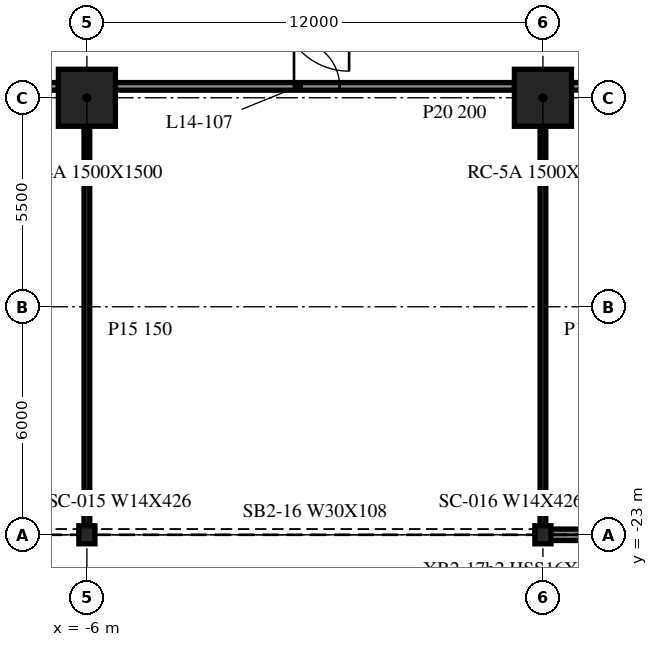
"""IFC4 building model, lengths in metres.
Left out: names, types, materials, properties, quantities, classifications, styles, units other than length and angle.
Written with IfcOpenShell. Run it as: python <this file> out.ifc"""

import sys

from ifc_helpers import new_model, si_unit, direction, frame, frame_2d, origin, origin_2d, place, context, subcontext, project, spatial, rectangle, i_section, extrude, element, fill, save


model = new_model("IFC4")
c1 = context("Model", 3, precision=1e-05, world=origin(), true_north=direction((0.0, 1.0)))
c2 = subcontext(c1, "Body", "Model", "MODEL_VIEW")
j1 = project(units=[si_unit("LENGTHUNIT", "METRE"), si_unit("PLANEANGLEUNIT", "RADIAN")], contexts=[c1])
p1 = place(None, origin())
s1 = spatial("IfcSite", under=j1, at=p1, CompositionType="ELEMENT")
p2 = place(p1, origin())
s2 = spatial("IfcBuilding", under=s1, at=p2, CompositionType="ELEMENT")
p3 = place(p2, frame((0.0, 0.0, 63.2)))
s3 = spatial("IfcBuildingStorey", under=s2, at=p3, CompositionType="ELEMENT", Elevation=63.2)
for number, where, z_axis, x_axis in (
    (1, (-6.0, -11.5, -0.34), (0.0, 0.0, 1.0), (1.0, 0.0, 0.0)),
    (2, (6.0, -11.5, -0.34), (0.0, 0.0, 1.0), (1.0, 0.0, 0.0)),
):
    element("IfcColumn", number, at=place(p3, frame(where, z_axis=z_axis, x_axis=x_axis)), inside=s3, PredefinedType="COLUMN", context=c2, shape_type="SweptSolid", body=[
        extrude(rectangle(XDim=1.5, YDim=1.5, at=origin_2d()), origin(), (0.0, 0.0, 1.0), 4.3),
    ])
for number, where, z_axis, x_axis in (
    (3, (-6.0, -23.0, -0.34), (0.0, 0.0, 1.0), (1.0, 0.0, 0.0)),
    (4, (6.0, -23.0, -0.34), (0.0, 0.0, 1.0), (1.0, 0.0, 0.0)),
):
    element("IfcColumn", number, at=place(p3, frame(where, z_axis=z_axis, x_axis=x_axis)), inside=s3, PredefinedType="COLUMN", context=c2, shape_type="SweptSolid", body=[
        extrude(i_section(OverallWidth=0.424, OverallDepth=0.475, WebThickness=0.048, FlangeThickness=0.077, at=origin_2d()), origin(), (0.0, 0.0, 1.0), 4.3),
    ])
p4 = place(p3, frame((6.024, -23.0, 0.0), z_axis=(0.0, 0.0, 1.0), x_axis=(1.0, 0.0, 0.0)))
e5 = element("IfcWall", 5, at=p4, inside=s3, PredefinedType="NOTDEFINED", context=c2, shape_type="SweptSolid", body=[
    extrude(rectangle(XDim=11.952, YDim=0.3, at=frame_2d((5.976, 0.0))), origin(), (0.0, 0.0, 1.0), 3.203),
])
p5 = place(p3, frame((-17.25, -11.2, 0.0), z_axis=(0.0, 0.0, 1.0), x_axis=(1.0, 0.0, 0.0)))
e6 = element("IfcWall", 6, at=p5, inside=s3, PredefinedType="PARTITIONING", context=c2, shape_type="SweptSolid", body=[
    extrude(rectangle(XDim=10.5, YDim=0.2, at=frame_2d((5.25, 0.0))), origin(), (0.0, 0.0, 1.0), 3.96),
])
p6 = place(p5, frame((0.9, 0.0, 0.0)))
e7 = element("IfcOpeningElement", 7, at=p6, cuts=e6, PredefinedType="OPENING", context=c2, shape_type="SweptSolid", body=[
    extrude(rectangle(XDim=1.0, YDim=2.1, at=frame_2d((0.5, 1.05))), frame((0.0, 0.11, 0.0), z_axis=(0.0, -1.0, 0.0), x_axis=(1.0, 0.0, 0.0)), (0.0, 0.0, 1.0), 0.22),
])
p7 = place(p5, frame((3.7, 0.0, 0.0)))
e8 = element("IfcOpeningElement", 8, at=p7, cuts=e6, PredefinedType="OPENING", context=c2, shape_type="SweptSolid", body=[
    extrude(rectangle(XDim=1.2, YDim=2.1, at=frame_2d((0.6, 1.05))), frame((0.0, 0.11, 0.0), z_axis=(0.0, -1.0, 0.0), x_axis=(1.0, 0.0, 0.0)), (0.0, 0.0, 1.0), 0.22),
])
p8 = place(p5, frame((5.5, 0.0, 0.0)))
e9 = element("IfcOpeningElement", 9, at=p8, cuts=e6, PredefinedType="OPENING", context=c2, shape_type="SweptSolid", body=[
    extrude(rectangle(XDim=1.2, YDim=2.1, at=frame_2d((0.6, 1.05))), frame((0.0, 0.11, 0.0), z_axis=(0.0, -1.0, 0.0), x_axis=(1.0, 0.0, 0.0)), (0.0, 0.0, 1.0), 0.22),
])
p9 = place(p3, frame((-5.25, -11.2, 0.0), z_axis=(0.0, 0.0, 1.0), x_axis=(1.0, 0.0, 0.0)))
e10 = element("IfcWall", 10, at=p9, inside=s3, PredefinedType="PARTITIONING", context=c2, shape_type="SweptSolid", body=[
    extrude(rectangle(XDim=10.5, YDim=0.2, at=frame_2d((5.25, 0.0))), origin(), (0.0, 0.0, 1.0), 3.96),
])
p10 = place(p9, frame((4.7, 0.0, 0.0)))
e11 = element("IfcOpeningElement", 11, at=p10, cuts=e10, PredefinedType="OPENING", context=c2, shape_type="SweptSolid", body=[
    extrude(rectangle(XDim=1.2, YDim=2.1, at=frame_2d((0.6, 1.05))), frame((0.0, 0.11, 0.0), z_axis=(0.0, -1.0, 0.0), x_axis=(1.0, 0.0, 0.0)), (0.0, 0.0, 1.0), 0.22),
])
p11 = place(p3, frame((6.75, -11.2, 0.0), z_axis=(0.0, 0.0, 1.0), x_axis=(1.0, 0.0, 0.0)))
e12 = element("IfcWall", 12, at=p11, inside=s3, PredefinedType="PARTITIONING", context=c2, shape_type="SweptSolid", body=[
    extrude(rectangle(XDim=10.5, YDim=0.2, at=frame_2d((5.25, 0.0))), origin(), (0.0, 0.0, 1.0), 3.96),
])
p12 = place(p11, frame((0.7, 0.0, 0.0)))
e13 = element("IfcOpeningElement", 13, at=p12, cuts=e12, PredefinedType="OPENING", context=c2, shape_type="SweptSolid", body=[
    extrude(rectangle(XDim=1.2, YDim=2.1, at=frame_2d((0.6, 1.05))), frame((0.0, 0.11, 0.0), z_axis=(0.0, -1.0, 0.0), x_axis=(1.0, 0.0, 0.0)), (0.0, 0.0, 1.0), 0.22),
])
p13 = place(p11, frame((3.7, 0.0, 0.0)))
e14 = element("IfcOpeningElement", 14, at=p13, cuts=e12, PredefinedType="OPENING", context=c2, shape_type="SweptSolid", body=[
    extrude(rectangle(XDim=1.2, YDim=2.1, at=frame_2d((0.6, 1.05))), frame((0.0, 0.11, 0.0), z_axis=(0.0, -1.0, 0.0), x_axis=(1.0, 0.0, 0.0)), (0.0, 0.0, 1.0), 0.22),
])
p14 = place(p11, frame((5.5, 0.0, 0.0)))
e15 = element("IfcOpeningElement", 15, at=p14, cuts=e12, PredefinedType="OPENING", context=c2, shape_type="SweptSolid", body=[
    extrude(rectangle(XDim=1.2, YDim=2.1, at=frame_2d((0.6, 1.05))), frame((0.0, 0.11, 0.0), z_axis=(0.0, -1.0, 0.0), x_axis=(1.0, 0.0, 0.0)), (0.0, 0.0, 1.0), 0.22),
])
for number, where, z_axis, x_axis in (
    (16, (-6.0, -22.975, 0.0), (0.0, 0.0, 1.0), (0.0, 1.0, 0.0)),
    (17, (6.0, -22.975, 0.0), (0.0, 0.0, 1.0), (0.0, 1.0, 0.0)),
):
    element("IfcWall", number, at=place(p3, frame(where, z_axis=z_axis, x_axis=x_axis)), inside=s3, PredefinedType="PARTITIONING", context=c2, shape_type="SweptSolid", body=[
        extrude(rectangle(XDim=10.725, YDim=0.15, at=frame_2d((5.363, 0.0))), origin(), (0.0, 0.0, 1.0), 3.96),
    ])
p15 = place(p10, origin())
e18 = element("IfcDoor", 18, at=p15, inside=s3, OperationType="SINGLE_SWING_LEFT", PredefinedType="DOOR", context=c2, shape_type="SweptSolid", body=[
    extrude(rectangle(XDim=1.2, YDim=2.1, at=frame_2d((0.6, 1.05))), frame((0.0, 0.025, 0.0), z_axis=(0.0, -1.0, 0.0), x_axis=(1.0, 0.0, 0.0)), (0.0, 0.0, 1.0), 0.05),
])
fill(e11, e18)
save(model, sys.argv[1])
